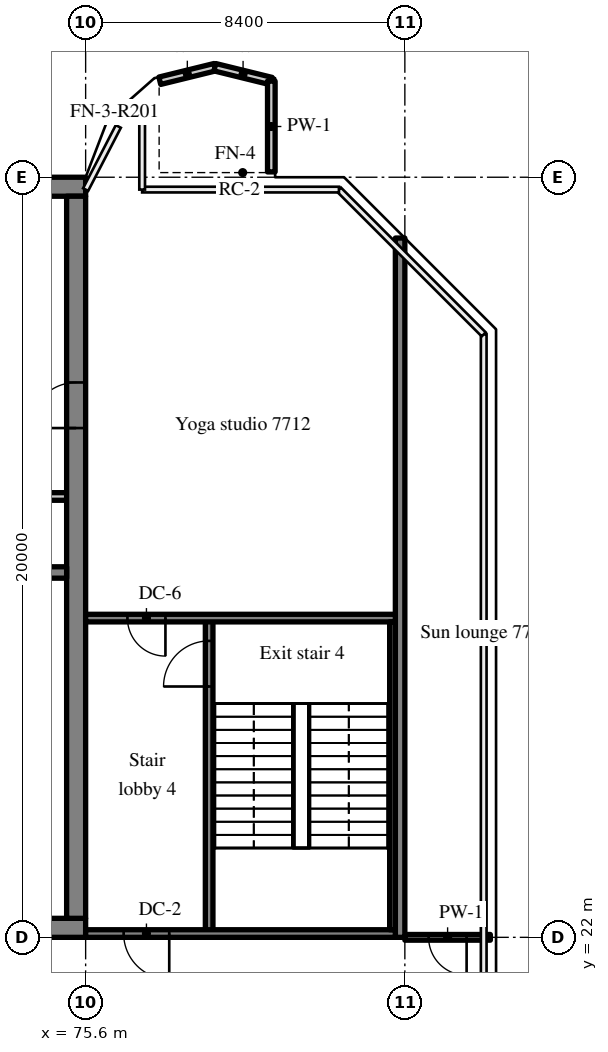
"""IFC4 building model, lengths in metres.
Left out: names, types, materials, properties, quantities, classifications, styles, units other than length and angle.
Written with IfcOpenShell. Run it as: python <this file> out.ifc"""

import sys

from ifc_helpers import new_model, si_unit, direction, frame, frame_2d, origin, place, context, subcontext, project, spatial, rectangle, extrude, source, transform, mapped, element, fill, save


model = new_model("IFC4")
c1 = context("Model", 3, precision=1e-05, world=origin(), true_north=direction((0.0, 1.0)))
c2 = subcontext(c1, "Body", "Model", "MODEL_VIEW")
j1 = project(units=[si_unit("LENGTHUNIT", "METRE"), si_unit("PLANEANGLEUNIT", "RADIAN")], contexts=[c1])
p1 = place(None, origin())
s1 = spatial("IfcSite", under=j1, at=p1, CompositionType="ELEMENT")
p2 = place(p1, origin())
s2 = spatial("IfcBuilding", under=s1, at=p2, CompositionType="ELEMENT")
p3 = place(p2, frame((0.0, 0.0, 323.7)))
s3 = spatial("IfcBuildingStorey", under=s2, at=p3, CompositionType="ELEMENT", Elevation=323.7)
m1 = source(origin(), c2, "Body", "SweptSolid", [
    extrude(rectangle(XDim=50.4, YDim=0.5, at=frame_2d((25.2, 0.0))), origin(), (0.0, 0.0, 1.0), 5.72),
])
p4 = place(p3, frame((25.2, 22.25, 0.0), z_axis=(0.0, 0.0, 1.0), x_axis=(1.0, 0.0, 0.0)))
e1 = element("IfcWall", 1, at=p4, inside=s3, PredefinedType="SHEAR", context=c2, shape_type="MappedRepresentation", body=[
    mapped(m1, transform((0.0, 0.0, 0.0), scale=1.0)),
])
m2 = source(origin(), c2, "Body", "SweptSolid", [
    extrude(rectangle(XDim=1.8, YDim=2.1, at=frame_2d((0.9, 1.05))), frame((0.0, 0.26, 0.0), z_axis=(0.0, -1.0, 0.0), x_axis=(1.0, 0.0, 0.0)), (0.0, 0.0, 1.0), 0.52),
])
p5 = place(p4, frame((15.9, 0.0, 0.0)))
e2 = element("IfcOpeningElement", 2, at=p5, cuts=e1, PredefinedType="OPENING", context=c2, shape_type="MappedRepresentation", body=[
    mapped(m2, transform((0.0, 0.0, 0.0), scale=1.0)),
])
m3 = source(origin(), c2, "Body", "SweptSolid", [
    extrude(rectangle(XDim=0.9, YDim=2.1, at=frame_2d((0.45, 1.05))), frame((0.0, 0.26, 0.0), z_axis=(0.0, -1.0, 0.0), x_axis=(1.0, 0.0, 0.0)), (0.0, 0.0, 1.0), 0.52),
])
p6 = place(p4, frame((9.675, 0.0, 0.0)))
e3 = element("IfcOpeningElement", 3, at=p6, cuts=e1, PredefinedType="OPENING", context=c2, shape_type="MappedRepresentation", body=[
    mapped(m3, transform((0.0, 0.0, 0.0), scale=1.0)),
])
p7 = place(p4, frame((21.525, 0.0, 0.0)))
e4 = element("IfcOpeningElement", 4, at=p7, cuts=e1, PredefinedType="OPENING", context=c2, shape_type="MappedRepresentation", body=[
    mapped(m3, transform((0.0, 0.0, 0.0), scale=1.0)),
])
p8 = place(p4, frame((32.7, 0.0, 0.0)))
e5 = element("IfcOpeningElement", 5, at=p8, cuts=e1, PredefinedType="OPENING", context=c2, shape_type="MappedRepresentation", body=[
    mapped(m2, transform((0.0, 0.0, 0.0), scale=1.0)),
])
m4 = source(origin(), c2, "Body", "SweptSolid", [
    extrude(rectangle(XDim=1.2, YDim=2.1, at=frame_2d((0.6, 1.05))), frame((0.0, 0.26, 0.0), z_axis=(0.0, -1.0, 0.0), x_axis=(1.0, 0.0, 0.0)), (0.0, 0.0, 1.0), 0.52),
])
p9 = place(p4, frame((6.5, 0.0, 0.0)))
e6 = element("IfcOpeningElement", 6, at=p9, cuts=e1, PredefinedType="OPENING", context=c2, shape_type="MappedRepresentation", body=[
    mapped(m4, transform((0.0, 0.0, 0.0), scale=1.0)),
])
p10 = place(p4, frame((47.975, 0.0, 0.0)))
e7 = element("IfcOpeningElement", 7, at=p10, cuts=e1, PredefinedType="OPENING", context=c2, shape_type="MappedRepresentation", body=[
    mapped(m4, transform((0.0, 0.0, 0.0), scale=1.0)),
])
p11 = place(p3, frame((25.2, 41.75, 0.0), z_axis=(0.0, 0.0, 1.0), x_axis=(1.0, 0.0, 0.0)))
e8 = element("IfcWall", 8, at=p11, inside=s3, PredefinedType="SHEAR", context=c2, shape_type="MappedRepresentation", body=[
    mapped(m1, transform((0.0, 0.0, 0.0), scale=1.0)),
])
m5 = source(origin(), c2, "Body", "SweptSolid", [
    extrude(rectangle(XDim=19.0, YDim=0.5, at=frame_2d((9.5, 0.0))), origin(), (0.0, 0.0, 1.0), 5.72),
])
p12 = place(p3, frame((75.35, 22.5, 0.0), z_axis=(0.0, 0.0, 1.0), x_axis=(0.0, 1.0, 0.0)))
e9 = element("IfcWall", 9, at=p12, inside=s3, PredefinedType="SHEAR", context=c2, shape_type="MappedRepresentation", body=[
    mapped(m5, transform((0.0, 0.0, 0.0), scale=1.0)),
])
p13 = place(p12, frame((12.9, 0.0, 0.0)))
e10 = element("IfcOpeningElement", 10, at=p13, cuts=e9, PredefinedType="OPENING", context=c2, shape_type="MappedRepresentation", body=[
    mapped(m4, transform((0.0, 0.0, 0.0), scale=1.0)),
])
m6 = source(origin(), c2, "Body", "SweptSolid", [
    extrude(rectangle(XDim=7.75, YDim=0.3, at=frame_2d((3.875, 0.0))), origin(), (0.0, 0.0, 1.0), 5.72),
])
p14 = place(p3, frame((67.35, 31.6, 0.0), z_axis=(0.0, 0.0, 1.0), x_axis=(1.0, 0.0, 0.0)))
e11 = element("IfcWall", 11, at=p14, inside=s3, PredefinedType="SHEAR", context=c2, shape_type="MappedRepresentation", body=[
    mapped(m6, transform((0.0, 0.0, 0.0), scale=1.0)),
])
m7 = source(origin(), c2, "Body", "SweptSolid", [
    extrude(rectangle(XDim=1.1, YDim=2.1, at=frame_2d((0.55, 1.05))), frame((0.0, 0.16, 0.0), z_axis=(0.0, -1.0, 0.0), x_axis=(1.0, 0.0, 0.0)), (0.0, 0.0, 1.0), 0.32),
])
p15 = place(p14, frame((5.875, 0.0, 0.0)))
e12 = element("IfcOpeningElement", 12, at=p15, cuts=e11, PredefinedType="OPENING", context=c2, shape_type="MappedRepresentation", body=[
    mapped(m7, transform((0.0, 0.0, 0.0), scale=1.0)),
])
m8 = source(origin(), c2, "Body", "SweptSolid", [
    extrude(rectangle(XDim=18.4, YDim=0.25, at=frame_2d((9.2, 0.0))), origin(), (0.0, 0.0, 1.0), 5.72),
])
p16 = place(p3, frame((83.875, 22.0, 0.0), z_axis=(0.0, 0.0, 1.0), x_axis=(0.0, 1.0, 0.0)))
e13 = element("IfcWall", 13, at=p16, inside=s3, PredefinedType="SHEAR", context=c2, shape_type="MappedRepresentation", body=[
    mapped(m8, transform((0.0, 0.0, 0.0), scale=1.0)),
])
m9 = source(origin(), c2, "Body", "SweptSolid", [
    extrude(rectangle(XDim=1.491, YDim=0.2, at=frame_2d((0.746, 0.0))), origin(), (0.0, 0.0, 1.0), 1.1),
])
p17 = place(p3, frame((77.552, 44.539, -0.05), z_axis=(0.0, 0.0, 1.0), x_axis=(0.971088495324, 0.238719781855, 0.0)))
e14 = element("IfcWall", 14, at=p17, inside=s3, PredefinedType="PARAPET", context=c2, shape_type="MappedRepresentation", body=[
    mapped(m9, transform((0.0, 0.0, 0.0), scale=1.0)),
])
m10 = source(origin(), c2, "Body", "SweptSolid", [
    extrude(rectangle(XDim=1.53, YDim=0.2, at=frame_2d((0.765, 0.0))), origin(), (0.0, 0.0, 1.0), 1.1),
])
p18 = place(p3, frame((79.0, 44.895, -0.05), z_axis=(0.0, 0.0, 1.0), x_axis=(0.971064415522, -0.238817714808, 0.0)))
e15 = element("IfcWall", 15, at=p18, inside=s3, PredefinedType="PARAPET", context=c2, shape_type="MappedRepresentation", body=[
    mapped(m10, transform((0.0, 0.0, 0.0), scale=1.0)),
])
m11 = source(origin(), c2, "Body", "SweptSolid", [
    extrude(rectangle(XDim=2.39, YDim=0.2, at=frame_2d((1.195, 0.0))), origin(), (0.0, 0.0, 1.0), 1.1),
])
p19 = place(p3, frame((80.486, 44.53, -0.05), z_axis=(0.0, 0.0, 1.0), x_axis=(0.0, -1.0, 0.0)))
e16 = element("IfcWall", 16, at=p19, inside=s3, PredefinedType="PARAPET", context=c2, shape_type="MappedRepresentation", body=[
    mapped(m11, transform((0.0, 0.0, 0.0), scale=1.0)),
])
m12 = source(origin(), c2, "Body", "SweptSolid", [
    extrude(rectangle(XDim=2.65, YDim=0.2, at=frame_2d((1.325, 0.0))), origin(), (0.0, 0.0, 1.0), 5.72),
])
p20 = place(p3, frame((72.45, 33.6, 0.0), z_axis=(0.0, 0.0, 1.0), x_axis=(1.0, 0.0, 0.0)))
e17 = element("IfcWall", 17, at=p20, inside=s3, PredefinedType="SOLIDWALL", context=c2, shape_type="MappedRepresentation", body=[
    mapped(m12, transform((0.0, 0.0, 0.0), scale=1.0)),
])
m13 = source(origin(), c2, "Body", "SweptSolid", [
    extrude(rectangle(XDim=8.3, YDim=0.2, at=frame_2d((4.15, 0.0))), origin(), (0.0, 0.0, 1.0), 5.72),
])
p21 = place(p3, frame((78.85, 22.1, 0.0), z_axis=(0.0, 0.0, 1.0), x_axis=(0.0, 1.0, 0.0)))
e18 = element("IfcWall", 18, at=p21, inside=s3, PredefinedType="SOLIDWALL", context=c2, shape_type="MappedRepresentation", body=[
    mapped(m13, transform((0.0, 0.0, 0.0), scale=1.0)),
])
m14 = source(origin(), c2, "Body", "SweptSolid", [
    extrude(rectangle(XDim=1.2, YDim=2.1, at=frame_2d((0.6, 1.05))), frame((0.0, 0.11, 0.0), z_axis=(0.0, -1.0, 0.0), x_axis=(1.0, 0.0, 0.0)), (0.0, 0.0, 1.0), 0.22),
])
p22 = place(p21, frame((6.5, 0.0, 0.0)))
e19 = element("IfcOpeningElement", 19, at=p22, cuts=e18, PredefinedType="OPENING", context=c2, shape_type="MappedRepresentation", body=[
    mapped(m14, transform((0.0, 0.0, 0.0), scale=1.0)),
])
m15 = source(origin(), c2, "Body", "SweptSolid", [
    extrude(rectangle(XDim=8.15, YDim=0.2, at=frame_2d((4.075, 0.0))), origin(), (0.0, 0.0, 1.0), 5.72),
])
p23 = place(p3, frame((83.75, 22.1, 0.0), z_axis=(0.0, 0.0, 1.0), x_axis=(-1.0, 0.0, 0.0)))
e20 = element("IfcWall", 20, at=p23, inside=s3, PredefinedType="SOLIDWALL", context=c2, shape_type="MappedRepresentation", body=[
    mapped(m15, transform((0.0, 0.0, 0.0), scale=1.0)),
])
p24 = place(p23, frame((5.95, 0.0, 0.0)))
e21 = element("IfcOpeningElement", 21, at=p24, cuts=e20, PredefinedType="OPENING", context=c2, shape_type="MappedRepresentation", body=[
    mapped(m14, transform((0.0, 0.0, 0.0), scale=1.0)),
])
p25 = place(p3, frame((83.75, 30.4, 0.0), z_axis=(0.0, 0.0, 1.0), x_axis=(-1.0, 0.0, 0.0)))
e22 = element("IfcWall", 22, at=p25, inside=s3, PredefinedType="SOLIDWALL", context=c2, shape_type="MappedRepresentation", body=[
    mapped(m15, transform((0.0, 0.0, 0.0), scale=1.0)),
])
m16 = source(origin(), c2, "Body", "SweptSolid", [
    extrude(rectangle(XDim=1.0, YDim=2.1, at=frame_2d((0.5, 1.05))), frame((0.0, 0.11, 0.0), z_axis=(0.0, -1.0, 0.0), x_axis=(1.0, 0.0, 0.0)), (0.0, 0.0, 1.0), 0.22),
])
p26 = place(p25, frame((6.05, 0.0, 0.0)))
e23 = element("IfcOpeningElement", 23, at=p26, cuts=e22, PredefinedType="OPENING", context=c2, shape_type="MappedRepresentation", body=[
    mapped(m16, transform((0.0, 0.0, 0.0), scale=1.0)),
])
m17 = source(origin(), c2, "Body", "SweptSolid", [
    extrude(rectangle(XDim=8.1, YDim=0.15, at=frame_2d((4.05, 0.0))), origin(), (0.0, 0.0, 1.0), 5.72),
])
p27 = place(p3, frame((83.675, 22.2, 0.0), z_axis=(0.0, 0.0, 1.0), x_axis=(0.0, 1.0, 0.0)))
e24 = element("IfcWall", 24, at=p27, inside=s3, PredefinedType="SOLIDWALL", context=c2, shape_type="MappedRepresentation", body=[
    mapped(m17, transform((0.0, 0.0, 0.0), scale=1.0)),
])
m18 = source(origin(), c2, "Body", "SweptSolid", [
    extrude(rectangle(XDim=2.25, YDim=0.15, at=frame_2d((1.125, 0.0))), origin(), (0.0, 0.0, 1.0), 5.02),
])
p28 = place(p3, frame((84.0, 22.0, 0.0), z_axis=(0.0, 0.0, 1.0), x_axis=(1.0, 0.0, 0.0)))
e25 = element("IfcWall", 25, at=p28, inside=s3, PredefinedType="PARTITIONING", context=c2, shape_type="MappedRepresentation", body=[
    mapped(m18, transform((0.0, 0.0, 0.0), scale=1.0)),
])
m19 = source(origin(), c2, "Body", "SweptSolid", [
    extrude(rectangle(XDim=1.0, YDim=2.1, at=frame_2d((0.5, 1.05))), frame((0.0, 0.085, 0.0), z_axis=(0.0, -1.0, 0.0), x_axis=(1.0, 0.0, 0.0)), (0.0, 0.0, 1.0), 0.17),
])
p29 = place(p28, frame((0.625, 0.0, 0.0)))
e26 = element("IfcOpeningElement", 26, at=p29, cuts=e25, PredefinedType="OPENING", context=c2, shape_type="MappedRepresentation", body=[
    mapped(m19, transform((0.0, 0.0, 0.0), scale=1.0)),
])
m20 = source(origin(), c2, "Body", "SweptSolid", [
    extrude(rectangle(XDim=1.2, YDim=2.1, at=frame_2d((0.6, 1.05))), frame((0.0, 0.025, 0.0), z_axis=(0.0, -1.0, 0.0), x_axis=(1.0, 0.0, 0.0)), (0.0, 0.0, 1.0), 0.05),
])
p30 = place(p13, origin())
e27 = element("IfcDoor", 27, at=p30, inside=s3, OperationType="SINGLE_SWING_LEFT", PredefinedType="DOOR", context=c2, shape_type="MappedRepresentation", body=[
    mapped(m20, transform((0.0, 0.0, 0.0), scale=1.0)),
])
fill(e10, e27)
p31 = place(p22, origin())
e28 = element("IfcDoor", 28, at=p31, inside=s3, OperationType="SINGLE_SWING_LEFT", PredefinedType="DOOR", context=c2, shape_type="MappedRepresentation", body=[
    mapped(m20, transform((0.0, 0.0, 0.0), scale=1.0)),
])
fill(e19, e28)
p32 = place(p24, origin())
e29 = element("IfcDoor", 29, at=p32, inside=s3, OperationType="SINGLE_SWING_LEFT", PredefinedType="DOOR", context=c2, shape_type="MappedRepresentation", body=[
    mapped(m20, transform((0.0, 0.0, 0.0), scale=1.0)),
])
fill(e21, e29)
m21 = source(origin(), c2, "Body", "SweptSolid", [
    extrude(rectangle(XDim=1.0, YDim=2.1, at=frame_2d((0.5, 1.05))), frame((0.0, 0.025, 0.0), z_axis=(0.0, -1.0, 0.0), x_axis=(1.0, 0.0, 0.0)), (0.0, 0.0, 1.0), 0.05),
])
p33 = place(p26, origin())
e30 = element("IfcDoor", 30, at=p33, inside=s3, OperationType="SINGLE_SWING_LEFT", PredefinedType="DOOR", context=c2, shape_type="MappedRepresentation", body=[
    mapped(m21, transform((0.0, 0.0, 0.0), scale=1.0)),
])
fill(e23, e30)
p34 = place(p29, origin())
e31 = element("IfcDoor", 31, at=p34, inside=s3, OperationType="SINGLE_SWING_RIGHT", PredefinedType="DOOR", context=c2, shape_type="MappedRepresentation", body=[
    mapped(m21, transform((0.0, 0.0, 0.0), scale=1.0)),
])
fill(e26, e31)
save(model, sys.argv[1])
